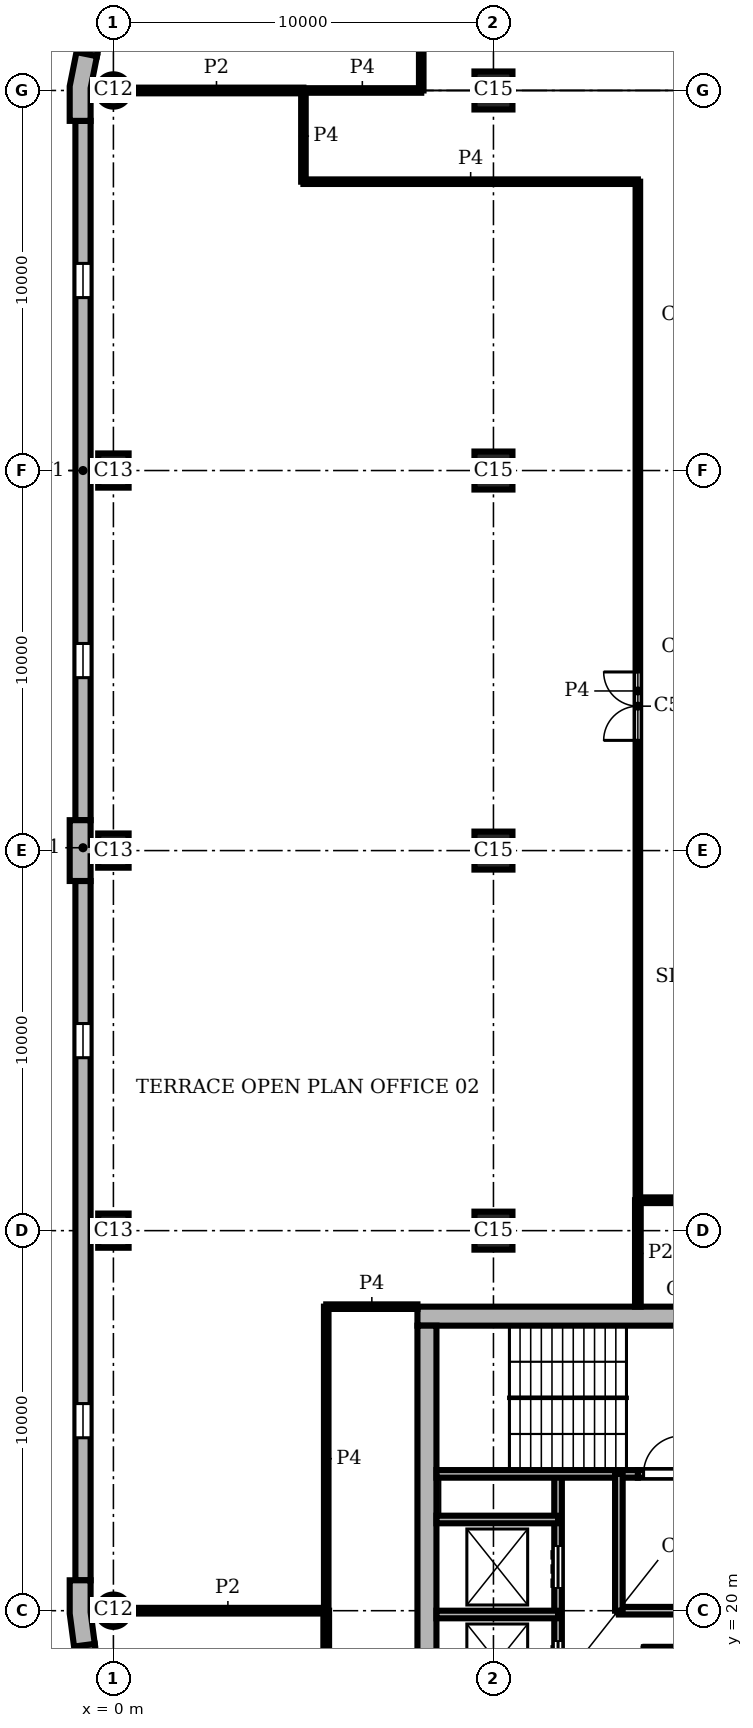
"""IFC4 building model, lengths in metres.
Left out: names, types, materials, properties, quantities, classifications, styles, units other than length and angle.
Written with IfcOpenShell. Run it as: python <this file> out.ifc"""

import sys

from ifc_helpers import new_model, si_unit, direction, frame, frame_2d, origin, origin_2d, place, context, subcontext, project, spatial, polyline, rectangle, circle, outline, extrude, element, fill, save


model = new_model("IFC4")
c1 = context("Model", 3, precision=1e-05, world=origin(), true_north=direction((0.0, 1.0)))
c2 = subcontext(c1, "Body", "Model", "MODEL_VIEW")
j1 = project(units=[si_unit("LENGTHUNIT", "METRE"), si_unit("PLANEANGLEUNIT", "RADIAN")], contexts=[c1])
p1 = place(None, origin())
s1 = spatial("IfcSite", under=j1, at=p1, CompositionType="ELEMENT")
p2 = place(p1, origin())
s2 = spatial("IfcBuilding", under=s1, at=p2, CompositionType="ELEMENT")
p3 = place(p2, frame((0.0, 0.0, 290.4)))
s3 = spatial("IfcBuildingStorey", under=s2, at=p3, CompositionType="ELEMENT", Elevation=290.4)
p4 = place(p3, frame((0.0, 60.0, 0.0), z_axis=(0.0, 0.0, 1.0), x_axis=(1.0, 0.0, 0.0)))
e1 = element("IfcColumn", 1, at=p4, inside=s3, PredefinedType="COLUMN", context=c2, shape_type="SweptSolid", body=[
    extrude(circle(Radius=0.425, at=origin_2d()), origin(), (0.0, 0.0, 1.0), 3.9),
])
for number, where, z_axis, x_axis in (
    (2, (0.0, 50.0, 0.0), (0.0, 0.0, 1.0), (0.0, 1.0, 0.0)),
    (3, (0.0, 40.0, 0.0), (0.0, 0.0, 1.0), (0.0, 1.0, 0.0)),
    (4, (0.0, 30.0, 0.0), (0.0, 0.0, 1.0), (0.0, 1.0, 0.0)),
):
    element("IfcColumn", number, at=place(p3, frame(where, z_axis=z_axis, x_axis=x_axis)), inside=s3, PredefinedType="COLUMN", context=c2, shape_type="SweptSolid", body=[
        extrude(rectangle(XDim=0.9, YDim=0.8, at=origin_2d()), origin(), (0.0, 0.0, 1.0), 3.9),
    ])
p5 = place(p3, frame((0.0, 20.0, 0.0), z_axis=(0.0, 0.0, 1.0), x_axis=(1.0, 0.0, 0.0)))
e5 = element("IfcColumn", 5, at=p5, inside=s3, PredefinedType="COLUMN", context=c2, shape_type="SweptSolid", body=[
    extrude(circle(Radius=0.425, at=origin_2d()), origin(), (0.0, 0.0, 1.0), 3.9),
])
for number, where, z_axis, x_axis in (
    (6, (10.0, 30.0, 0.0), (0.0, 0.0, 1.0), (1.0, 0.0, 0.0)),
    (7, (10.0, 40.0, 0.0), (0.0, 0.0, 1.0), (1.0, 0.0, 0.0)),
    (8, (10.0, 50.0, 0.0), (0.0, 0.0, 1.0), (1.0, 0.0, 0.0)),
    (9, (10.0, 60.0, 0.0), (0.0, 0.0, 1.0), (1.0, 0.0, 0.0)),
):
    element("IfcColumn", number, at=place(p3, frame(where, z_axis=z_axis, x_axis=x_axis)), inside=s3, PredefinedType="COLUMN", context=c2, shape_type="SweptSolid", body=[
        extrude(rectangle(XDim=1.0, YDim=1.0, at=origin_2d()), origin(), (0.0, 0.0, 1.0), 3.9),
    ])
p6 = place(p3, frame((28.0, 27.75, 0.0), z_axis=(0.0, 0.0, 1.0), x_axis=(-1.0, 0.0, 0.0)))
e10 = element("IfcWall", 10, at=p6, inside=s3, PredefinedType="SHEAR", context=c2, shape_type="SweptSolid", body=[
    extrude(rectangle(XDim=20.0, YDim=0.5, at=frame_2d((10.0, 0.0))), origin(), (0.0, 0.0, 1.0), 3.9),
])
p7 = place(p3, frame((8.25, 27.5, 0.0), z_axis=(0.0, 0.0, 1.0), x_axis=(0.0, -1.0, 0.0)))
e11 = element("IfcWall", 11, at=p7, inside=s3, PredefinedType="SHEAR", context=c2, shape_type="SweptSolid", body=[
    extrude(rectangle(XDim=19.0, YDim=0.5, at=frame_2d((9.5, 0.0))), origin(), (0.0, 0.0, 1.0), 3.9),
])
p8 = place(p3, origin())
e12 = element("IfcWall", 12, at=p8, inside=s3, PredefinedType="SOLIDWALL", context=c2, shape_type="SweptSolid", body=[
    extrude(outline(polyline([(-0.825, 60.98), (-0.972, 61.009), (-1.15, 60.113), (-1.15, 59.2), (-1.0, 59.2), (-0.6, 59.2), (-0.6, 60.059), (-0.432, 60.902), (-0.825, 60.98)])), origin(), (0.0, 0.0, 1.0), 3.9),
])
e13 = element("IfcWall", 13, at=p8, inside=s3, PredefinedType="SOLIDWALL", context=c2, shape_type="SweptSolid", body=[
    extrude(outline(polyline([(-0.6, 39.2), (-0.6, 39.85), (-0.45, 39.85), (-0.45, 40.15), (-0.6, 40.15), (-0.6, 40.8), (-1.0, 40.8), (-1.15, 40.8), (-1.15, 40.0), (-1.15, 39.2), (-1.0, 39.2), (-0.6, 39.2)])), origin(), (0.0, 0.0, 1.0), 3.9),
])
e14 = element("IfcWall", 14, at=p8, inside=s3, PredefinedType="SOLIDWALL", context=c2, shape_type="SweptSolid", body=[
    extrude(outline(polyline([(-1.0, 20.8), (-1.15, 20.8), (-1.15, 19.925), (-1.036, 19.057), (-0.887, 19.076), (-0.49, 19.128), (-0.6, 19.961), (-0.6, 20.8), (-1.0, 20.8)])), origin(), (0.0, 0.0, 1.0), 3.9),
])
p9 = place(p3, frame((0.299, 65.602, 0.0), z_axis=(0.0, 0.0, 1.0), x_axis=(-0.195098533057, -0.98078364709, 0.0)))
e15 = element("IfcWall", 15, at=p9, inside=s3, PredefinedType="SOLIDWALL", context=c2, shape_type="SweptSolid", body=[
    extrude(rectangle(XDim=4.753, YDim=0.4, at=frame_2d((2.376, 0.0))), origin(), (0.0, 0.0, 1.0), 3.9),
])
p10 = place(p9, frame((0.226, 0.0, 0.9)))
e16 = element("IfcOpeningElement", 16, at=p10, cuts=e15, PredefinedType="OPENING", context=c2, shape_type="SweptSolid", body=[
    extrude(rectangle(XDim=4.3, YDim=2.35, at=frame_2d((2.15, 1.175))), frame((0.0, 0.21, 0.0), z_axis=(0.0, -1.0, 0.0), x_axis=(1.0, 0.0, 0.0)), (0.0, 0.0, 1.0), 0.42),
])
p11 = place(p3, frame((-0.8, 59.2, 0.0), z_axis=(0.0, 0.0, 1.0), x_axis=(0.0, -1.0, 0.0)))
e17 = element("IfcWall", 17, at=p11, inside=s3, PredefinedType="SOLIDWALL", context=c2, shape_type="SweptSolid", body=[
    extrude(rectangle(XDim=18.4, YDim=0.4, at=frame_2d((9.2, 0.0))), origin(), (0.0, 0.0, 1.0), 3.9),
])
p12 = place(p11, frame((3.75, 0.0, 0.9)))
e18 = element("IfcOpeningElement", 18, at=p12, cuts=e17, PredefinedType="OPENING", context=c2, shape_type="SweptSolid", body=[
    extrude(rectangle(XDim=0.9, YDim=2.35, at=frame_2d((0.45, 1.175))), frame((0.0, 0.21, 0.0), z_axis=(0.0, -1.0, 0.0), x_axis=(1.0, 0.0, 0.0)), (0.0, 0.0, 1.0), 0.42),
])
p13 = place(p11, frame((13.75, 0.0, 0.9)))
e19 = element("IfcOpeningElement", 19, at=p13, cuts=e17, PredefinedType="OPENING", context=c2, shape_type="SweptSolid", body=[
    extrude(rectangle(XDim=0.9, YDim=2.35, at=frame_2d((0.45, 1.175))), frame((0.0, 0.21, 0.0), z_axis=(0.0, -1.0, 0.0), x_axis=(1.0, 0.0, 0.0)), (0.0, 0.0, 1.0), 0.42),
])
p14 = place(p3, frame((-0.8, 39.2, 0.0), z_axis=(0.0, 0.0, 1.0), x_axis=(0.0, -1.0, 0.0)))
e20 = element("IfcWall", 20, at=p14, inside=s3, PredefinedType="SOLIDWALL", context=c2, shape_type="SweptSolid", body=[
    extrude(rectangle(XDim=18.4, YDim=0.4, at=frame_2d((9.2, 0.0))), origin(), (0.0, 0.0, 1.0), 3.9),
])
p15 = place(p14, frame((3.75, 0.0, 0.9)))
e21 = element("IfcOpeningElement", 21, at=p15, cuts=e20, PredefinedType="OPENING", context=c2, shape_type="SweptSolid", body=[
    extrude(rectangle(XDim=0.9, YDim=2.35, at=frame_2d((0.45, 1.175))), frame((0.0, 0.21, 0.0), z_axis=(0.0, -1.0, 0.0), x_axis=(1.0, 0.0, 0.0)), (0.0, 0.0, 1.0), 0.42),
])
p16 = place(p14, frame((13.75, 0.0, 0.9)))
e22 = element("IfcOpeningElement", 22, at=p16, cuts=e20, PredefinedType="OPENING", context=c2, shape_type="SweptSolid", body=[
    extrude(rectangle(XDim=0.9, YDim=2.35, at=frame_2d((0.45, 1.175))), frame((0.0, 0.21, 0.0), z_axis=(0.0, -1.0, 0.0), x_axis=(1.0, 0.0, 0.0)), (0.0, 0.0, 1.0), 0.42),
])
p17 = place(p3, frame((-0.689, 19.102, 0.0), z_axis=(0.0, 0.0, 1.0), x_axis=(0.130514280502, -0.991446429508, 0.0)))
e23 = element("IfcWall", 23, at=p17, inside=s3, PredefinedType="SOLIDWALL", context=c2, shape_type="SweptSolid", body=[
    extrude(rectangle(XDim=4.121, YDim=0.4, at=frame_2d((2.061, 0.0))), origin(), (0.0, 0.0, 1.0), 3.9),
])
p18 = place(p17, frame((1.611, 0.0, 0.9)))
e24 = element("IfcOpeningElement", 24, at=p18, cuts=e23, PredefinedType="OPENING", context=c2, shape_type="SweptSolid", body=[
    extrude(rectangle(XDim=0.9, YDim=2.35, at=frame_2d((0.45, 1.175))), frame((0.0, 0.21, 0.0), z_axis=(0.0, -1.0, 0.0), x_axis=(1.0, 0.0, 0.0)), (0.0, 0.0, 1.0), 0.42),
])
p19 = place(p3, frame((14.0, 19.0, 0.0), z_axis=(0.0, 0.0, 1.0), x_axis=(1.0, 0.0, 0.0)))
e25 = element("IfcWall", 25, at=p19, inside=s3, PredefinedType="PARTITIONING", context=c2, shape_type="SweptSolid", body=[
    extrude(rectangle(XDim=8.0, YDim=0.1, at=frame_2d((4.0, 0.0))), origin(), (0.0, 0.0, 1.0), 3.58),
])
p20 = place(p19, frame((5.45, 0.0, 0.0)))
e26 = element("IfcOpeningElement", 26, at=p20, cuts=e25, PredefinedType="OPENING", context=c2, shape_type="SweptSolid", body=[
    extrude(rectangle(XDim=1.1, YDim=2.1, at=frame_2d((0.55, 1.05))), frame((0.0, 0.06, 0.0), z_axis=(0.0, -1.0, 0.0), x_axis=(1.0, 0.0, 0.0)), (0.0, 0.0, 1.0), 0.12),
])
p21 = place(p3, frame((8.5, 19.9, 0.0), z_axis=(0.0, 0.0, 1.0), x_axis=(1.0, 0.0, 0.0)))
e27 = element("IfcWall", 27, at=p21, inside=s3, PredefinedType="SHEAR", context=c2, shape_type="SweptSolid", body=[
    extrude(rectangle(XDim=3.2, YDim=0.2, at=frame_2d((1.6, 0.0))), origin(), (0.0, 0.0, 1.0), 3.58),
])
p22 = place(p3, frame((13.3, 20.0, 0.0), z_axis=(0.0, 0.0, 1.0), x_axis=(1.0, 0.0, 0.0)))
e28 = element("IfcWall", 28, at=p22, inside=s3, PredefinedType="SHEAR", context=c2, shape_type="SweptSolid", body=[
    extrude(rectangle(XDim=4.7, YDim=0.2, at=frame_2d((2.35, 0.0))), origin(), (0.0, 0.0, 1.0), 3.58),
])
p23 = place(p3, frame((8.5, 22.4, 0.0), z_axis=(0.0, 0.0, 1.0), x_axis=(1.0, 0.0, 0.0)))
e29 = element("IfcWall", 29, at=p23, inside=s3, PredefinedType="SHEAR", context=c2, shape_type="SweptSolid", body=[
    extrude(rectangle(XDim=3.2, YDim=0.2, at=frame_2d((1.6, 0.0))), origin(), (0.0, 0.0, 1.0), 3.58),
])
p24 = place(p3, frame((8.5, 23.6, 0.0), z_axis=(0.0, 0.0, 1.0), x_axis=(1.0, 0.0, 0.0)))
e30 = element("IfcWall", 30, at=p24, inside=s3, PredefinedType="SHEAR", context=c2, shape_type="SweptSolid", body=[
    extrude(rectangle(XDim=5.3, YDim=0.2, at=frame_2d((2.65, 0.0))), origin(), (0.0, 0.0, 1.0), 3.58),
])
p25 = place(p3, frame((13.8, 23.6, 0.0), z_axis=(0.0, 0.0, 1.0), x_axis=(1.0, 0.0, 0.0)))
e31 = element("IfcWall", 31, at=p25, inside=s3, PredefinedType="SHEAR", context=c2, shape_type="SweptSolid", body=[
    extrude(rectangle(XDim=13.7, YDim=0.2, at=frame_2d((6.85, 0.0))), origin(), (0.0, 0.0, 1.0), 3.58),
])
p26 = place(p25, frame((2.4, 0.0, 0.0)))
e32 = element("IfcOpeningElement", 32, at=p26, cuts=e31, PredefinedType="OPENING", context=c2, shape_type="SweptSolid", body=[
    extrude(rectangle(XDim=1.1, YDim=2.1, at=frame_2d((0.55, 1.05))), frame((0.0, 0.11, 0.0), z_axis=(0.0, -1.0, 0.0), x_axis=(1.0, 0.0, 0.0)), (0.0, 0.0, 1.0), 0.22),
])
p27 = place(p25, frame((4.9, 0.0, 0.0)))
e33 = element("IfcOpeningElement", 33, at=p27, cuts=e31, PredefinedType="OPENING", context=c2, shape_type="SweptSolid", body=[
    extrude(rectangle(XDim=1.1, YDim=2.1, at=frame_2d((0.55, 1.05))), frame((0.0, 0.11, 0.0), z_axis=(0.0, -1.0, 0.0), x_axis=(1.0, 0.0, 0.0)), (0.0, 0.0, 1.0), 0.22),
])
p28 = place(p25, frame((0.15, 0.0, 0.0)))
e34 = element("IfcOpeningElement", 34, at=p28, cuts=e31, PredefinedType="OPENING", context=c2, shape_type="SweptSolid", body=[
    extrude(rectangle(XDim=1.0, YDim=2.1, at=frame_2d((0.5, 1.05))), frame((0.0, 0.11, 0.0), z_axis=(0.0, -1.0, 0.0), x_axis=(1.0, 0.0, 0.0)), (0.0, 0.0, 1.0), 0.22),
])
p29 = place(p3, frame((11.7, 12.4, 0.0), z_axis=(0.0, 0.0, 1.0), x_axis=(0.0, 1.0, 0.0)))
e35 = element("IfcWall", 35, at=p29, inside=s3, PredefinedType="SHEAR", context=c2, shape_type="SweptSolid", body=[
    extrude(rectangle(XDim=11.2, YDim=0.2, at=frame_2d((5.6, 0.0))), origin(), (0.0, 0.0, 1.0), 3.58),
])
p30 = place(p29, frame((0.7, 0.0, 0.0)))
e36 = element("IfcOpeningElement", 36, at=p30, cuts=e35, PredefinedType="OPENING", context=c2, shape_type="SweptSolid", body=[
    extrude(rectangle(XDim=1.1, YDim=2.1, at=frame_2d((0.55, 1.05))), frame((0.0, 0.11, 0.0), z_axis=(0.0, -1.0, 0.0), x_axis=(1.0, 0.0, 0.0)), (0.0, 0.0, 1.0), 0.22),
])
p31 = place(p29, frame((3.2, 0.0, 0.0)))
e37 = element("IfcOpeningElement", 37, at=p31, cuts=e35, PredefinedType="OPENING", context=c2, shape_type="SweptSolid", body=[
    extrude(rectangle(XDim=1.1, YDim=2.1, at=frame_2d((0.55, 1.05))), frame((0.0, 0.11, 0.0), z_axis=(0.0, -1.0, 0.0), x_axis=(1.0, 0.0, 0.0)), (0.0, 0.0, 1.0), 0.22),
])
p32 = place(p29, frame((5.7, 0.0, 0.0)))
e38 = element("IfcOpeningElement", 38, at=p32, cuts=e35, PredefinedType="OPENING", context=c2, shape_type="SweptSolid", body=[
    extrude(rectangle(XDim=1.1, YDim=2.1, at=frame_2d((0.55, 1.05))), frame((0.0, 0.11, 0.0), z_axis=(0.0, -1.0, 0.0), x_axis=(1.0, 0.0, 0.0)), (0.0, 0.0, 1.0), 0.22),
])
p33 = place(p29, frame((8.2, 0.0, 0.0)))
e39 = element("IfcOpeningElement", 39, at=p33, cuts=e35, PredefinedType="OPENING", context=c2, shape_type="SweptSolid", body=[
    extrude(rectangle(XDim=1.1, YDim=2.1, at=frame_2d((0.55, 1.05))), frame((0.0, 0.11, 0.0), z_axis=(0.0, -1.0, 0.0), x_axis=(1.0, 0.0, 0.0)), (0.0, 0.0, 1.0), 0.22),
])
p34 = place(p3, frame((13.3, 20.0, 0.0), z_axis=(0.0, 0.0, 1.0), x_axis=(0.0, 1.0, 0.0)))
e40 = element("IfcWall", 40, at=p34, inside=s3, PredefinedType="SHEAR", context=c2, shape_type="SweptSolid", body=[
    extrude(rectangle(XDim=3.6, YDim=0.2, at=frame_2d((1.8, 0.0))), origin(), (0.0, 0.0, 1.0), 3.58),
])
p35 = place(p3, frame((5.6, 15.0, 0.0), z_axis=(0.0, 0.0, 1.0), x_axis=(0.0, 1.0, 0.0)))
e41 = element("IfcWall", 41, at=p35, inside=s3, PredefinedType="PARTITIONING", context=c2, shape_type="SweptSolid", body=[
    extrude(rectangle(XDim=5.0, YDim=0.15, at=frame_2d((2.5, 0.0))), origin(), (0.0, 0.0, 1.0), 3.58),
])
p36 = place(p35, frame((1.85, 0.0, 0.0)))
e42 = element("IfcOpeningElement", 42, at=p36, cuts=e41, PredefinedType="OPENING", context=c2, shape_type="SweptSolid", body=[
    extrude(rectangle(XDim=1.0, YDim=2.1, at=frame_2d((0.5, 1.05))), frame((0.0, 0.085, 0.0), z_axis=(0.0, -1.0, 0.0), x_axis=(1.0, 0.0, 0.0)), (0.0, 0.0, 1.0), 0.17),
])
p37 = place(p3, frame((13.8, 28.0, 0.0), z_axis=(0.0, 0.0, 1.0), x_axis=(0.0, 1.0, 0.0)))
e43 = element("IfcWall", 43, at=p37, inside=s3, PredefinedType="PARTITIONING", context=c2, shape_type="SweptSolid", body=[
    extrude(rectangle(XDim=2.801, YDim=0.15, at=frame_2d((1.4, 0.0))), origin(), (0.0, 0.0, 1.0), 3.58),
])
p38 = place(p3, frame((0.425, 20.0, 0.0), z_axis=(0.0, 0.0, 1.0), x_axis=(1.0, 0.0, 0.0)))
e44 = element("IfcWall", 44, at=p38, inside=s3, PredefinedType="PARTITIONING", context=c2, shape_type="SweptSolid", body=[
    extrude(rectangle(XDim=5.175, YDim=0.15, at=frame_2d((2.587, 0.0))), origin(), (0.0, 0.0, 1.0), 3.58),
])
p39 = place(p3, frame((13.802, 30.8, 0.0), z_axis=(0.0, 0.0, 1.0), x_axis=(1.0, 0.0, 0.0)))
e45 = element("IfcWall", 45, at=p39, inside=s3, PredefinedType="PARTITIONING", context=c2, shape_type="SweptSolid", body=[
    extrude(rectangle(XDim=16.798, YDim=0.15, at=frame_2d((8.399, 0.0))), origin(), (0.0, 0.0, 1.0), 3.58),
])
p40 = place(p39, frame((7.6, 0.0, 0.0)))
e46 = element("IfcOpeningElement", 46, at=p40, cuts=e45, PredefinedType="OPENING", context=c2, shape_type="SweptSolid", body=[
    extrude(rectangle(XDim=1.0, YDim=2.1, at=frame_2d((0.5, 1.05))), frame((0.0, 0.085, 0.0), z_axis=(0.0, -1.0, 0.0), x_axis=(1.0, 0.0, 0.0)), (0.0, 0.0, 1.0), 0.17),
])
p41 = place(p3, frame((0.425, 60.0, 0.0), z_axis=(0.0, 0.0, 1.0), x_axis=(1.0, 0.0, 0.0)))
e47 = element("IfcWall", 47, at=p41, inside=s3, PredefinedType="PARTITIONING", context=c2, shape_type="SweptSolid", body=[
    extrude(rectangle(XDim=4.575, YDim=0.15, at=frame_2d((2.288, 0.0))), origin(), (0.0, 0.0, 1.0), 3.58),
])
p42 = place(p3, frame((5.0, 57.6, 0.0), z_axis=(0.0, 0.0, 1.0), x_axis=(0.0, 1.0, 0.0)))
e48 = element("IfcWall", 48, at=p42, inside=s3, PredefinedType="PARTITIONING", context=c2, shape_type="SweptSolid", body=[
    extrude(rectangle(XDim=2.4, YDim=0.12, at=frame_2d((1.2, 0.0))), origin(), (0.0, 0.0, 1.0), 3.58),
])
p43 = place(p3, frame((5.6, 20.0, 0.0), z_axis=(0.0, 0.0, 1.0), x_axis=(0.0, 1.0, 0.0)))
e49 = element("IfcWall", 49, at=p43, inside=s3, PredefinedType="PARTITIONING", context=c2, shape_type="SweptSolid", body=[
    extrude(rectangle(XDim=8.0, YDim=0.12, at=frame_2d((4.0, 0.0))), origin(), (0.0, 0.0, 1.0), 3.58),
])
p44 = place(p3, frame((8.1, 60.0, 0.0), z_axis=(0.0, 0.0, 1.0), x_axis=(0.0, 1.0, 0.0)))
e50 = element("IfcWall", 50, at=p44, inside=s3, PredefinedType="PARTITIONING", context=c2, shape_type="SweptSolid", body=[
    extrude(rectangle(XDim=6.4, YDim=0.12, at=frame_2d((3.2, 0.0))), origin(), (0.0, 0.0, 1.0), 3.58),
])
p45 = place(p44, frame((2.1, 0.0, 0.0)))
e51 = element("IfcOpeningElement", 51, at=p45, cuts=e50, PredefinedType="OPENING", context=c2, shape_type="SweptSolid", body=[
    extrude(rectangle(XDim=1.8, YDim=2.1, at=frame_2d((0.9, 1.05))), frame((0.0, 0.07, 0.0), z_axis=(0.0, -1.0, 0.0), x_axis=(1.0, 0.0, 0.0)), (0.0, 0.0, 1.0), 0.14),
])
p46 = place(p3, frame((13.8, 30.8, 0.0), z_axis=(0.0, 0.0, 1.0), x_axis=(0.0, 1.0, 0.0)))
e52 = element("IfcWall", 52, at=p46, inside=s3, PredefinedType="PARTITIONING", context=c2, shape_type="SweptSolid", body=[
    extrude(rectangle(XDim=26.8, YDim=0.12, at=frame_2d((13.4, 0.0))), origin(), (0.0, 0.0, 1.0), 3.58),
])
p47 = place(p46, frame((12.1, 0.0, 0.0)))
e53 = element("IfcOpeningElement", 53, at=p47, cuts=e52, PredefinedType="OPENING", context=c2, shape_type="SweptSolid", body=[
    extrude(rectangle(XDim=1.8, YDim=2.1, at=frame_2d((0.9, 1.05))), frame((0.0, 0.07, 0.0), z_axis=(0.0, -1.0, 0.0), x_axis=(1.0, 0.0, 0.0)), (0.0, 0.0, 1.0), 0.14),
])
p48 = place(p3, frame((5.6, 28.0, 0.0), z_axis=(0.0, 0.0, 1.0), x_axis=(1.0, 0.0, 0.0)))
e54 = element("IfcWall", 54, at=p48, inside=s3, PredefinedType="PARTITIONING", context=c2, shape_type="SweptSolid", body=[
    extrude(rectangle(XDim=2.4, YDim=0.12, at=frame_2d((1.2, 0.0))), origin(), (0.0, 0.0, 1.0), 3.58),
])
p49 = place(p3, frame((5.0, 57.6, 0.0), z_axis=(0.0, 0.0, 1.0), x_axis=(1.0, 0.0, 0.0)))
e55 = element("IfcWall", 55, at=p49, inside=s3, PredefinedType="PARTITIONING", context=c2, shape_type="SweptSolid", body=[
    extrude(rectangle(XDim=8.8, YDim=0.12, at=frame_2d((4.4, 0.0))), origin(), (0.0, 0.0, 1.0), 3.58),
])
p50 = place(p3, frame((5.0, 60.0, 0.0), z_axis=(0.0, 0.0, 1.0), x_axis=(1.0, 0.0, 0.0)))
e56 = element("IfcWall", 56, at=p50, inside=s3, PredefinedType="PARTITIONING", context=c2, shape_type="SweptSolid", body=[
    extrude(rectangle(XDim=3.1, YDim=0.12, at=frame_2d((1.55, 0.0))), origin(), (0.0, 0.0, 1.0), 3.58),
])
p51 = place(p12, origin())
e57 = element("IfcWindow", 57, at=p51, inside=s3, PartitioningType="SINGLE_PANEL", PredefinedType="WINDOW", context=c2, shape_type="SweptSolid", body=[
    extrude(rectangle(XDim=0.9, YDim=2.35, at=frame_2d((0.45, 1.175))), frame((0.0, 0.16, 0.0), z_axis=(0.0, -1.0, 0.0), x_axis=(1.0, 0.0, 0.0)), (0.0, 0.0, 1.0), 0.06),
])
fill(e18, e57)
p52 = place(p13, origin())
e58 = element("IfcWindow", 58, at=p52, inside=s3, PartitioningType="SINGLE_PANEL", PredefinedType="WINDOW", context=c2, shape_type="SweptSolid", body=[
    extrude(rectangle(XDim=0.9, YDim=2.35, at=frame_2d((0.45, 1.175))), frame((0.0, 0.16, 0.0), z_axis=(0.0, -1.0, 0.0), x_axis=(1.0, 0.0, 0.0)), (0.0, 0.0, 1.0), 0.06),
])
fill(e19, e58)
p53 = place(p15, origin())
e59 = element("IfcWindow", 59, at=p53, inside=s3, PartitioningType="SINGLE_PANEL", PredefinedType="WINDOW", context=c2, shape_type="SweptSolid", body=[
    extrude(rectangle(XDim=0.9, YDim=2.35, at=frame_2d((0.45, 1.175))), frame((0.0, 0.16, 0.0), z_axis=(0.0, -1.0, 0.0), x_axis=(1.0, 0.0, 0.0)), (0.0, 0.0, 1.0), 0.06),
])
fill(e21, e59)
p54 = place(p16, origin())
e60 = element("IfcWindow", 60, at=p54, inside=s3, PartitioningType="SINGLE_PANEL", PredefinedType="WINDOW", context=c2, shape_type="SweptSolid", body=[
    extrude(rectangle(XDim=0.9, YDim=2.35, at=frame_2d((0.45, 1.175))), frame((0.0, 0.16, 0.0), z_axis=(0.0, -1.0, 0.0), x_axis=(1.0, 0.0, 0.0)), (0.0, 0.0, 1.0), 0.06),
])
fill(e22, e60)
p55 = place(p32, origin())
e61 = element("IfcDoor", 61, at=p55, inside=s3, OperationType="DOUBLE_DOOR_SLIDING", PredefinedType="DOOR", context=c2, shape_type="SweptSolid", body=[
    extrude(rectangle(XDim=1.1, YDim=2.1, at=frame_2d((0.55, 1.05))), frame((0.0, 0.025, 0.0), z_axis=(0.0, -1.0, 0.0), x_axis=(1.0, 0.0, 0.0)), (0.0, 0.0, 1.0), 0.05),
])
fill(e38, e61)
p56 = place(p33, origin())
e62 = element("IfcDoor", 62, at=p56, inside=s3, OperationType="DOUBLE_DOOR_SLIDING", PredefinedType="DOOR", context=c2, shape_type="SweptSolid", body=[
    extrude(rectangle(XDim=1.1, YDim=2.1, at=frame_2d((0.55, 1.05))), frame((0.0, 0.025, 0.0), z_axis=(0.0, -1.0, 0.0), x_axis=(1.0, 0.0, 0.0)), (0.0, 0.0, 1.0), 0.05),
])
fill(e39, e62)
p57 = place(p28, origin())
e63 = element("IfcDoor", 63, at=p57, inside=s3, OperationType="SINGLE_SWING_RIGHT", PredefinedType="DOOR", context=c2, shape_type="SweptSolid", body=[
    extrude(rectangle(XDim=1.0, YDim=2.1, at=frame_2d((0.5, 1.05))), frame((0.0, 0.025, 0.0), z_axis=(0.0, -1.0, 0.0), x_axis=(1.0, 0.0, 0.0)), (0.0, 0.0, 1.0), 0.05),
])
fill(e34, e63)
p58 = place(p47, origin())
e64 = element("IfcDoor", 64, at=p58, inside=s3, OperationType="DOUBLE_DOOR_SINGLE_SWING", PredefinedType="DOOR", context=c2, shape_type="SweptSolid", body=[
    extrude(rectangle(XDim=1.8, YDim=2.1, at=frame_2d((0.9, 1.05))), frame((0.0, 0.025, 0.0), z_axis=(0.0, -1.0, 0.0), x_axis=(1.0, 0.0, 0.0)), (0.0, 0.0, 1.0), 0.05),
])
fill(e53, e64)
save(model, sys.argv[1])
